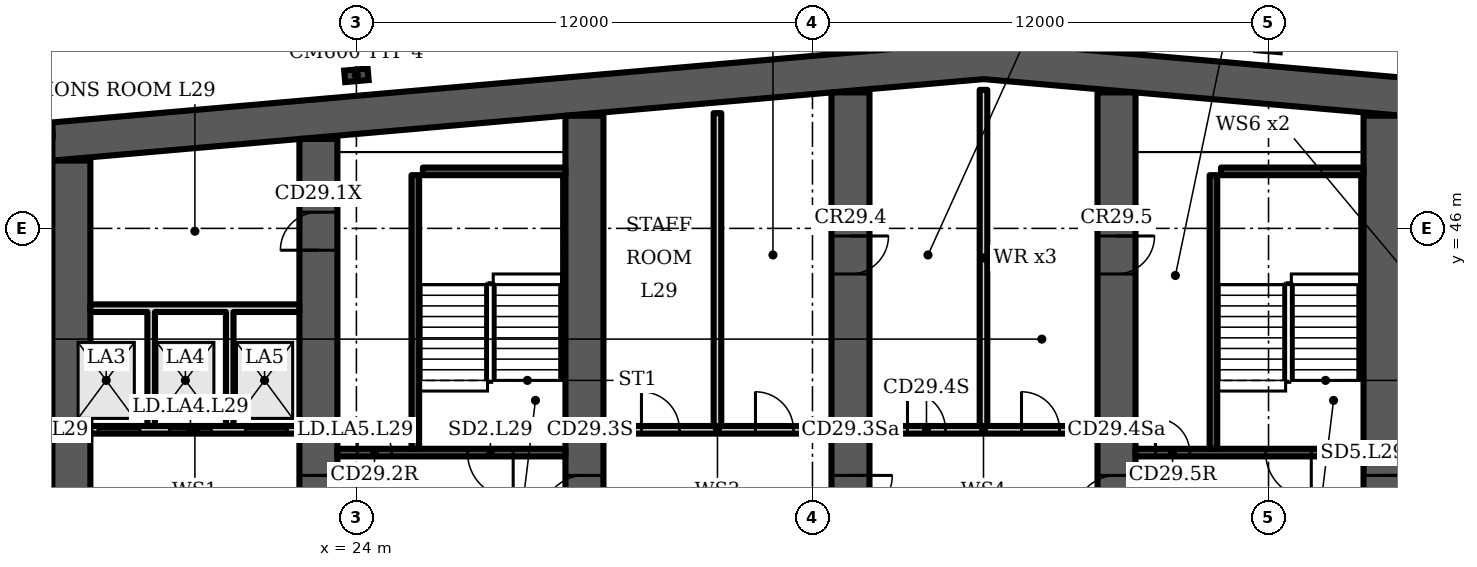
"""IFC4 building model, lengths in metres.
Left out: names, types, materials, properties, quantities, classifications, styles, units other than length and angle.
Written with IfcOpenShell. Run it as: python <this file> out.ifc"""

import sys

from ifc_helpers import new_model, si_unit, direction, frame, frame_2d, origin, origin_2d, place, context, subcontext, project, spatial, polyline, rectangle, i_section, outline, extrude, element, fill, save


model = new_model("IFC4")
c1 = context("Model", 3, precision=1e-05, world=origin(), true_north=direction((0.0, 1.0)))
c2 = subcontext(c1, "Body", "Model", "MODEL_VIEW")
j1 = project(units=[si_unit("LENGTHUNIT", "METRE"), si_unit("PLANEANGLEUNIT", "RADIAN")], contexts=[c1])
p1 = place(None, origin())
s1 = spatial("IfcSite", under=j1, at=p1, CompositionType="ELEMENT")
p2 = place(p1, origin())
s2 = spatial("IfcBuilding", under=s1, at=p2, CompositionType="ELEMENT")
p3 = place(p2, frame((0.0, 0.0, 125.5)))
s3 = spatial("IfcBuildingStorey", under=s2, at=p3, CompositionType="ELEMENT", Elevation=125.5)
p4 = place(p3, origin())
e1 = element("IfcWall", 1, at=p4, inside=s3, PredefinedType="SHEAR", context=c2, shape_type="SweptSolid", body=[
    extrude(outline(polyline([(16.0, 47.784), (40.5, 49.927), (65.0, 47.784), (65.0, 48.787), (40.5, 50.931), (16.0, 48.787), (16.0, 47.784)])), origin(), (0.0, 0.0, 1.0), 3.6),
])
p5 = place(p3, frame((16.5, 35.0, 0.0), z_axis=(0.0, 0.0, 1.0), x_axis=(0.0, 1.0, 0.0)))
e2 = element("IfcWall", 2, at=p5, inside=s3, PredefinedType="SHEAR", context=c2, shape_type="SweptSolid", body=[
    extrude(rectangle(XDim=12.784, YDim=1.0, at=frame_2d((6.392, 0.0))), origin(), (0.0, 0.0, 1.0), 3.6),
])
p6 = place(p3, frame((23.0, 35.0, 0.0), z_axis=(0.0, 0.0, 1.0), x_axis=(0.0, 1.0, 0.0)))
e3 = element("IfcWall", 3, at=p6, inside=s3, PredefinedType="SHEAR", context=c2, shape_type="SweptSolid", body=[
    extrude(rectangle(XDim=13.352, YDim=1.0, at=frame_2d((6.676, 0.0))), origin(), (0.0, 0.0, 1.0), 3.6),
])
p7 = place(p6, frame((10.426, 0.0, 0.0)))
e4 = element("IfcOpeningElement", 4, at=p7, cuts=e3, PredefinedType="OPENING", context=c2, shape_type="SweptSolid", body=[
    extrude(rectangle(XDim=1.0, YDim=2.1, at=frame_2d((0.5, 1.05))), frame((0.0, 0.51, 0.0), z_axis=(0.0, -1.0, 0.0), x_axis=(1.0, 0.0, 0.0)), (0.0, 0.0, 1.0), 1.02),
])
p8 = place(p6, frame((3.4, 0.0, 0.0)))
e5 = element("IfcOpeningElement", 5, at=p8, cuts=e3, PredefinedType="OPENING", context=c2, shape_type="SweptSolid", body=[
    extrude(rectangle(XDim=1.1, YDim=2.1, at=frame_2d((0.55, 1.05))), frame((0.0, 0.51, 0.0), z_axis=(0.0, -1.0, 0.0), x_axis=(1.0, 0.0, 0.0)), (0.0, 0.0, 1.0), 1.02),
])
p9 = place(p3, frame((30.0, 35.0, 0.0), z_axis=(0.0, 0.0, 1.0), x_axis=(0.0, 1.0, 0.0)))
e6 = element("IfcWall", 6, at=p9, inside=s3, PredefinedType="SHEAR", context=c2, shape_type="SweptSolid", body=[
    extrude(rectangle(XDim=13.965, YDim=1.0, at=frame_2d((6.982, 0.0))), origin(), (0.0, 0.0, 1.0), 3.6),
])
p10 = place(p9, frame((3.4, 0.0, 0.0)))
e7 = element("IfcOpeningElement", 7, at=p10, cuts=e6, PredefinedType="OPENING", context=c2, shape_type="SweptSolid", body=[
    extrude(rectangle(XDim=1.1, YDim=2.1, at=frame_2d((0.55, 1.05))), frame((0.0, 0.51, 0.0), z_axis=(0.0, -1.0, 0.0), x_axis=(1.0, 0.0, 0.0)), (0.0, 0.0, 1.0), 1.02),
])
p11 = place(p3, frame((37.0, 35.0, 0.0), z_axis=(0.0, 0.0, 1.0), x_axis=(0.0, 1.0, 0.0)))
e8 = element("IfcWall", 8, at=p11, inside=s3, PredefinedType="SHEAR", context=c2, shape_type="SweptSolid", body=[
    extrude(rectangle(XDim=14.577, YDim=1.0, at=frame_2d((7.289, 0.0))), origin(), (0.0, 0.0, 1.0), 3.6),
])
p12 = place(p11, frame((3.4, 0.0, 0.0)))
e9 = element("IfcOpeningElement", 9, at=p12, cuts=e8, PredefinedType="OPENING", context=c2, shape_type="SweptSolid", body=[
    extrude(rectangle(XDim=1.1, YDim=2.1, at=frame_2d((0.55, 1.05))), frame((0.0, 0.51, 0.0), z_axis=(0.0, -1.0, 0.0), x_axis=(1.0, 0.0, 0.0)), (0.0, 0.0, 1.0), 1.02),
])
p13 = place(p11, frame((9.8, 0.0, 0.0)))
e10 = element("IfcOpeningElement", 10, at=p13, cuts=e8, PredefinedType="OPENING", context=c2, shape_type="SweptSolid", body=[
    extrude(rectangle(XDim=1.0, YDim=2.1, at=frame_2d((0.5, 1.05))), frame((0.0, 0.51, 0.0), z_axis=(0.0, -1.0, 0.0), x_axis=(1.0, 0.0, 0.0)), (0.0, 0.0, 1.0), 1.02),
])
p14 = place(p3, frame((44.0, 35.0, 0.0), z_axis=(0.0, 0.0, 1.0), x_axis=(0.0, 1.0, 0.0)))
e11 = element("IfcWall", 11, at=p14, inside=s3, PredefinedType="SHEAR", context=c2, shape_type="SweptSolid", body=[
    extrude(rectangle(XDim=14.577, YDim=1.0, at=frame_2d((7.289, 0.0))), origin(), (0.0, 0.0, 1.0), 3.6),
])
p15 = place(p14, frame((3.4, 0.0, 0.0)))
e12 = element("IfcOpeningElement", 12, at=p15, cuts=e11, PredefinedType="OPENING", context=c2, shape_type="SweptSolid", body=[
    extrude(rectangle(XDim=1.1, YDim=2.1, at=frame_2d((0.55, 1.05))), frame((0.0, 0.51, 0.0), z_axis=(0.0, -1.0, 0.0), x_axis=(1.0, 0.0, 0.0)), (0.0, 0.0, 1.0), 1.02),
])
p16 = place(p14, frame((9.8, 0.0, 0.0)))
e13 = element("IfcOpeningElement", 13, at=p16, cuts=e11, PredefinedType="OPENING", context=c2, shape_type="SweptSolid", body=[
    extrude(rectangle(XDim=1.0, YDim=2.1, at=frame_2d((0.5, 1.05))), frame((0.0, 0.51, 0.0), z_axis=(0.0, -1.0, 0.0), x_axis=(1.0, 0.0, 0.0)), (0.0, 0.0, 1.0), 1.02),
])
p17 = place(p3, frame((51.0, 35.0, 0.0), z_axis=(0.0, 0.0, 1.0), x_axis=(0.0, 1.0, 0.0)))
e14 = element("IfcWall", 14, at=p17, inside=s3, PredefinedType="SHEAR", context=c2, shape_type="SweptSolid", body=[
    extrude(rectangle(XDim=13.965, YDim=1.0, at=frame_2d((6.982, 0.0))), origin(), (0.0, 0.0, 1.0), 3.6),
])
p18 = place(p17, frame((3.4, 0.0, 0.0)))
e15 = element("IfcOpeningElement", 15, at=p18, cuts=e14, PredefinedType="OPENING", context=c2, shape_type="SweptSolid", body=[
    extrude(rectangle(XDim=1.1, YDim=2.1, at=frame_2d((0.55, 1.05))), frame((0.0, 0.51, 0.0), z_axis=(0.0, -1.0, 0.0), x_axis=(1.0, 0.0, 0.0)), (0.0, 0.0, 1.0), 1.02),
])
for number, where, z_axis, x_axis in (
    (16, (24.0, 50.027, 0.0), (0.0, 0.0, 1.0), (-0.087, 0.996, 0.0)),
    (17, (48.0, 50.815, 0.0), (0.0, 0.0, 1.0), (0.087, 0.996, 0.0)),
):
    element("IfcColumn", number, at=place(p3, frame(where, z_axis=z_axis, x_axis=x_axis)), inside=s3, PredefinedType="COLUMN", context=c2, shape_type="SweptSolid", body=[
        extrude(i_section(OverallWidth=0.305, OverallDepth=0.62, WebThickness=0.021, FlangeThickness=0.04, FilletRadius=0.027, at=origin_2d()), origin(), (0.0, 0.0, 1.0), 3.6),
    ])
p19 = place(p3, frame((16.0, 48.587, 0.0), z_axis=(0.0, 0.0, 1.0), x_axis=(-0.996194, -0.087168, 0.0)))
e18 = element("IfcWall", 18, at=p19, inside=s3, PredefinedType="SOLIDWALL", context=c2, shape_type="SweptSolid", body=[
    extrude(rectangle(XDim=2.994, YDim=0.4, at=frame_2d((1.497, 0.0))), origin(), (0.0, 0.0, 1.0), 3.2),
])
p20 = place(p3, frame((17.0, 40.7, 0.0), z_axis=(0.0, 0.0, 1.0), x_axis=(1.0, 0.0, 0.0)))
e19 = element("IfcWall", 19, at=p20, inside=s3, PredefinedType="PARTITIONING", context=c2, shape_type="SweptSolid", body=[
    extrude(rectangle(XDim=5.5, YDim=0.2, at=frame_2d((2.75, 0.0))), origin(), (0.0, 0.0, 1.0), 3.2),
])
p21 = place(p20, frame((0.2, 0.0, 0.0)))
e20 = element("IfcOpeningElement", 20, at=p21, cuts=e19, PredefinedType="OPENING", context=c2, shape_type="SweptSolid", body=[
    extrude(rectangle(XDim=1.1, YDim=2.1, at=frame_2d((0.55, 1.05))), frame((0.0, 0.11, 0.0), z_axis=(0.0, -1.0, 0.0), x_axis=(1.0, 0.0, 0.0)), (0.0, 0.0, 1.0), 0.22),
])
p22 = place(p20, frame((2.083, 0.0, 0.0)))
e21 = element("IfcOpeningElement", 21, at=p22, cuts=e19, PredefinedType="OPENING", context=c2, shape_type="SweptSolid", body=[
    extrude(rectangle(XDim=1.1, YDim=2.1, at=frame_2d((0.55, 1.05))), frame((0.0, 0.11, 0.0), z_axis=(0.0, -1.0, 0.0), x_axis=(1.0, 0.0, 0.0)), (0.0, 0.0, 1.0), 0.22),
])
p23 = place(p20, frame((4.083, 0.0, 0.0)))
e22 = element("IfcOpeningElement", 22, at=p23, cuts=e19, PredefinedType="OPENING", context=c2, shape_type="SweptSolid", body=[
    extrude(rectangle(XDim=1.1, YDim=2.1, at=frame_2d((0.55, 1.05))), frame((0.0, 0.11, 0.0), z_axis=(0.0, -1.0, 0.0), x_axis=(1.0, 0.0, 0.0)), (0.0, 0.0, 1.0), 0.22),
])
p24 = place(p3, frame((0.0, 0.0, -0.0)))
e23 = element("IfcWall", 23, at=p24, inside=s3, PredefinedType="PARTITIONING", context=c2, shape_type="SweptSolid", body=[
    extrude(outline(polyline([(18.7, 40.8), (18.5, 40.8), (18.5, 43.8), (17.0, 43.8), (17.0, 44.0), (22.5, 44.0), (22.5, 43.8), (20.767, 43.8), (20.767, 40.8), (20.567, 40.8), (20.567, 43.8), (18.7, 43.8), (18.7, 40.8)])), origin(), (0.0, 0.0, 1.0), 3.2),
])
p25 = place(p3, frame((23.5, 40.1, 0.0), z_axis=(0.0, 0.0, 1.0), x_axis=(1.0, 0.0, 0.0)))
e24 = element("IfcWall", 24, at=p25, inside=s3, PredefinedType="SHEAR", context=c2, shape_type="SweptSolid", body=[
    extrude(rectangle(XDim=6.0, YDim=0.2, at=frame_2d((3.0, 0.0))), origin(), (0.0, 0.0, 1.0), 3.2),
])
p26 = place(p25, frame((3.425, 0.0, 0.0)))
e25 = element("IfcOpeningElement", 25, at=p26, cuts=e24, PredefinedType="OPENING", context=c2, shape_type="SweptSolid", body=[
    extrude(rectangle(XDim=1.2, YDim=2.1, at=frame_2d((0.6, 1.05))), frame((0.0, 0.11, 0.0), z_axis=(0.0, -1.0, 0.0), x_axis=(1.0, 0.0, 0.0)), (0.0, 0.0, 1.0), 0.22),
])
p27 = place(p25, frame((0.525, 0.0, 0.0)))
e26 = element("IfcOpeningElement", 26, at=p27, cuts=e24, PredefinedType="OPENING", context=c2, shape_type="SweptSolid", body=[
    extrude(rectangle(XDim=0.9, YDim=2.1, at=frame_2d((0.45, 1.05))), frame((0.0, 0.11, 0.0), z_axis=(0.0, -1.0, 0.0), x_axis=(1.0, 0.0, 0.0)), (0.0, 0.0, 1.0), 0.22),
])
p28 = place(p3, frame((25.55, 40.2, 0.0), z_axis=(0.0, 0.0, 1.0), x_axis=(0.0, 1.0, 0.0)))
e27 = element("IfcWall", 27, at=p28, inside=s3, PredefinedType="SHEAR", context=c2, shape_type="SweptSolid", body=[
    extrude(rectangle(XDim=7.2, YDim=0.2, at=frame_2d((3.6, 0.0))), origin(), (0.0, 0.0, 1.0), 3.2),
])
p29 = place(p3, frame((25.75, 47.5, 0.0), z_axis=(0.0, 0.0, 1.0), x_axis=(1.0, 0.0, 0.0)))
e28 = element("IfcWall", 28, at=p29, inside=s3, PredefinedType="SHEAR", context=c2, shape_type="SweptSolid", body=[
    extrude(rectangle(XDim=3.75, YDim=0.2, at=frame_2d((1.875, 0.0))), origin(), (0.0, 0.0, 1.0), 3.2),
])
p30 = place(p3, frame((30.5, 40.7, 0.0), z_axis=(0.0, 0.0, 1.0), x_axis=(1.0, 0.0, 0.0)))
e29 = element("IfcWall", 29, at=p30, inside=s3, PredefinedType="PARTITIONING", context=c2, shape_type="SweptSolid", body=[
    extrude(rectangle(XDim=6.0, YDim=0.2, at=frame_2d((3.0, 0.0))), origin(), (0.0, 0.0, 1.0), 3.2),
])
p31 = place(p30, frame((1.0, 0.0, 0.0)))
e30 = element("IfcOpeningElement", 30, at=p31, cuts=e29, PredefinedType="OPENING", context=c2, shape_type="SweptSolid", body=[
    extrude(rectangle(XDim=1.0, YDim=2.1, at=frame_2d((0.5, 1.05))), frame((0.0, 0.11, 0.0), z_axis=(0.0, -1.0, 0.0), x_axis=(1.0, 0.0, 0.0)), (0.0, 0.0, 1.0), 0.22),
])
p32 = place(p30, frame((4.0, 0.0, 0.0)))
e31 = element("IfcOpeningElement", 31, at=p32, cuts=e29, PredefinedType="OPENING", context=c2, shape_type="SweptSolid", body=[
    extrude(rectangle(XDim=1.0, YDim=2.1, at=frame_2d((0.5, 1.05))), frame((0.0, 0.11, 0.0), z_axis=(0.0, -1.0, 0.0), x_axis=(1.0, 0.0, 0.0)), (0.0, 0.0, 1.0), 0.22),
])
p33 = place(p3, frame((33.5, 40.8, 0.0), z_axis=(0.0, 0.0, 1.0), x_axis=(0.0, 1.0, 0.0)))
e32 = element("IfcWall", 32, at=p33, inside=s3, PredefinedType="PARTITIONING", context=c2, shape_type="SweptSolid", body=[
    extrude(rectangle(XDim=8.232, YDim=0.2, at=frame_2d((4.116, 0.0))), origin(), (0.0, 0.0, 1.0), 3.2),
])
p34 = place(p3, frame((37.5, 40.7, 0.0), z_axis=(0.0, 0.0, 1.0), x_axis=(1.0, 0.0, 0.0)))
e33 = element("IfcWall", 33, at=p34, inside=s3, PredefinedType="PARTITIONING", context=c2, shape_type="SweptSolid", body=[
    extrude(rectangle(XDim=6.0, YDim=0.2, at=frame_2d((3.0, 0.0))), origin(), (0.0, 0.0, 1.0), 3.2),
])
p35 = place(p34, frame((1.0, 0.0, 0.0)))
e34 = element("IfcOpeningElement", 34, at=p35, cuts=e33, PredefinedType="OPENING", context=c2, shape_type="SweptSolid", body=[
    extrude(rectangle(XDim=1.0, YDim=2.1, at=frame_2d((0.5, 1.05))), frame((0.0, 0.11, 0.0), z_axis=(0.0, -1.0, 0.0), x_axis=(1.0, 0.0, 0.0)), (0.0, 0.0, 1.0), 0.22),
])
p36 = place(p34, frame((4.0, 0.0, 0.0)))
e35 = element("IfcOpeningElement", 35, at=p36, cuts=e33, PredefinedType="OPENING", context=c2, shape_type="SweptSolid", body=[
    extrude(rectangle(XDim=1.0, YDim=2.1, at=frame_2d((0.5, 1.05))), frame((0.0, 0.11, 0.0), z_axis=(0.0, -1.0, 0.0), x_axis=(1.0, 0.0, 0.0)), (0.0, 0.0, 1.0), 0.22),
])
p37 = place(p3, frame((40.5, 40.8, 0.0), z_axis=(0.0, 0.0, 1.0), x_axis=(0.0, 1.0, 0.0)))
e36 = element("IfcWall", 36, at=p37, inside=s3, PredefinedType="PARTITIONING", context=c2, shape_type="SweptSolid", body=[
    extrude(rectangle(XDim=8.844, YDim=0.2, at=frame_2d((4.422, 0.0))), origin(), (0.0, 0.0, 1.0), 3.2),
])
p38 = place(p3, frame((44.5, 40.1, 0.0), z_axis=(0.0, 0.0, 1.0), x_axis=(1.0, 0.0, 0.0)))
e37 = element("IfcWall", 37, at=p38, inside=s3, PredefinedType="SHEAR", context=c2, shape_type="SweptSolid", body=[
    extrude(rectangle(XDim=6.0, YDim=0.2, at=frame_2d((3.0, 0.0))), origin(), (0.0, 0.0, 1.0), 3.2),
])
p39 = place(p38, frame((3.425, 0.0, 0.0)))
e38 = element("IfcOpeningElement", 38, at=p39, cuts=e37, PredefinedType="OPENING", context=c2, shape_type="SweptSolid", body=[
    extrude(rectangle(XDim=1.2, YDim=2.1, at=frame_2d((0.6, 1.05))), frame((0.0, 0.11, 0.0), z_axis=(0.0, -1.0, 0.0), x_axis=(1.0, 0.0, 0.0)), (0.0, 0.0, 1.0), 0.22),
])
p40 = place(p38, frame((0.525, 0.0, 0.0)))
e39 = element("IfcOpeningElement", 39, at=p40, cuts=e37, PredefinedType="OPENING", context=c2, shape_type="SweptSolid", body=[
    extrude(rectangle(XDim=0.9, YDim=2.1, at=frame_2d((0.45, 1.05))), frame((0.0, 0.11, 0.0), z_axis=(0.0, -1.0, 0.0), x_axis=(1.0, 0.0, 0.0)), (0.0, 0.0, 1.0), 0.22),
])
p41 = place(p3, frame((46.55, 40.2, 0.0), z_axis=(0.0, 0.0, 1.0), x_axis=(0.0, 1.0, 0.0)))
e40 = element("IfcWall", 40, at=p41, inside=s3, PredefinedType="SHEAR", context=c2, shape_type="SweptSolid", body=[
    extrude(rectangle(XDim=7.2, YDim=0.2, at=frame_2d((3.6, 0.0))), origin(), (0.0, 0.0, 1.0), 3.2),
])
p42 = place(p3, frame((46.75, 47.5, 0.0), z_axis=(0.0, 0.0, 1.0), x_axis=(1.0, 0.0, 0.0)))
e41 = element("IfcWall", 41, at=p42, inside=s3, PredefinedType="SHEAR", context=c2, shape_type="SweptSolid", body=[
    extrude(rectangle(XDim=3.75, YDim=0.2, at=frame_2d((1.875, 0.0))), origin(), (0.0, 0.0, 1.0), 3.2),
])
p43 = place(p21, origin())
e42 = element("IfcDoor", 42, at=p43, inside=s3, OperationType="DOUBLE_DOOR_SLIDING", PredefinedType="DOOR", context=c2, shape_type="SweptSolid", body=[
    extrude(rectangle(XDim=1.1, YDim=2.1, at=frame_2d((0.55, 1.05))), frame((0.0, 0.025, 0.0), z_axis=(0.0, -1.0, 0.0), x_axis=(1.0, 0.0, 0.0)), (0.0, 0.0, 1.0), 0.05),
])
fill(e20, e42)
p44 = place(p22, origin())
e43 = element("IfcDoor", 43, at=p44, inside=s3, OperationType="DOUBLE_DOOR_SLIDING", PredefinedType="DOOR", context=c2, shape_type="SweptSolid", body=[
    extrude(rectangle(XDim=1.1, YDim=2.1, at=frame_2d((0.55, 1.05))), frame((0.0, 0.025, 0.0), z_axis=(0.0, -1.0, 0.0), x_axis=(1.0, 0.0, 0.0)), (0.0, 0.0, 1.0), 0.05),
])
fill(e21, e43)
p45 = place(p23, origin())
e44 = element("IfcDoor", 44, at=p45, inside=s3, OperationType="DOUBLE_DOOR_SLIDING", PredefinedType="DOOR", context=c2, shape_type="SweptSolid", body=[
    extrude(rectangle(XDim=1.1, YDim=2.1, at=frame_2d((0.55, 1.05))), frame((0.0, 0.025, 0.0), z_axis=(0.0, -1.0, 0.0), x_axis=(1.0, 0.0, 0.0)), (0.0, 0.0, 1.0), 0.05),
])
fill(e22, e44)
p46 = place(p7, origin())
e45 = element("IfcDoor", 45, at=p46, inside=s3, OperationType="SINGLE_SWING_LEFT", PredefinedType="DOOR", context=c2, shape_type="SweptSolid", body=[
    extrude(rectangle(XDim=1.0, YDim=2.1, at=frame_2d((0.5, 1.05))), frame((0.0, 0.5, 0.0), z_axis=(0.0, -1.0, 0.0), x_axis=(1.0, 0.0, 0.0)), (0.0, 0.0, 1.0), 1.0),
])
fill(e4, e45)
p47 = place(p26, origin())
e46 = element("IfcDoor", 46, at=p47, inside=s3, OperationType="SINGLE_SWING_RIGHT", PredefinedType="DOOR", context=c2, shape_type="SweptSolid", body=[
    extrude(rectangle(XDim=1.2, YDim=2.1, at=frame_2d((0.6, 1.05))), frame((0.0, 0.025, 0.0), z_axis=(0.0, -1.0, 0.0), x_axis=(1.0, 0.0, 0.0)), (0.0, 0.0, 1.0), 0.05),
])
fill(e25, e46)
p48 = place(p27, origin())
e47 = element("IfcDoor", 47, at=p48, inside=s3, OperationType="SINGLE_SWING_LEFT", PredefinedType="DOOR", context=c2, shape_type="SweptSolid", body=[
    extrude(rectangle(XDim=0.9, YDim=2.1, at=frame_2d((0.45, 1.05))), frame((0.0, 0.025, 0.0), z_axis=(0.0, -1.0, 0.0), x_axis=(1.0, 0.0, 0.0)), (0.0, 0.0, 1.0), 0.05),
])
fill(e26, e47)
p49 = place(p31, origin())
e48 = element("IfcDoor", 48, at=p49, inside=s3, OperationType="SINGLE_SWING_LEFT", PredefinedType="DOOR", context=c2, shape_type="SweptSolid", body=[
    extrude(rectangle(XDim=1.0, YDim=2.1, at=frame_2d((0.5, 1.05))), frame((0.0, 0.025, 0.0), z_axis=(0.0, -1.0, 0.0), x_axis=(1.0, 0.0, 0.0)), (0.0, 0.0, 1.0), 0.05),
])
fill(e30, e48)
p50 = place(p32, origin())
e49 = element("IfcDoor", 49, at=p50, inside=s3, OperationType="SINGLE_SWING_LEFT", PredefinedType="DOOR", context=c2, shape_type="SweptSolid", body=[
    extrude(rectangle(XDim=1.0, YDim=2.1, at=frame_2d((0.5, 1.05))), frame((0.0, 0.025, 0.0), z_axis=(0.0, -1.0, 0.0), x_axis=(1.0, 0.0, 0.0)), (0.0, 0.0, 1.0), 0.05),
])
fill(e31, e49)
p51 = place(p35, origin())
e50 = element("IfcDoor", 50, at=p51, inside=s3, OperationType="SINGLE_SWING_LEFT", PredefinedType="DOOR", context=c2, shape_type="SweptSolid", body=[
    extrude(rectangle(XDim=1.0, YDim=2.1, at=frame_2d((0.5, 1.05))), frame((0.0, 0.025, 0.0), z_axis=(0.0, -1.0, 0.0), x_axis=(1.0, 0.0, 0.0)), (0.0, 0.0, 1.0), 0.05),
])
fill(e34, e50)
p52 = place(p36, origin())
e51 = element("IfcDoor", 51, at=p52, inside=s3, OperationType="SINGLE_SWING_LEFT", PredefinedType="DOOR", context=c2, shape_type="SweptSolid", body=[
    extrude(rectangle(XDim=1.0, YDim=2.1, at=frame_2d((0.5, 1.05))), frame((0.0, 0.025, 0.0), z_axis=(0.0, -1.0, 0.0), x_axis=(1.0, 0.0, 0.0)), (0.0, 0.0, 1.0), 0.05),
])
fill(e35, e51)
p53 = place(p39, origin())
e52 = element("IfcDoor", 52, at=p53, inside=s3, OperationType="SINGLE_SWING_RIGHT", PredefinedType="DOOR", context=c2, shape_type="SweptSolid", body=[
    extrude(rectangle(XDim=1.2, YDim=2.1, at=frame_2d((0.6, 1.05))), frame((0.0, 0.025, 0.0), z_axis=(0.0, -1.0, 0.0), x_axis=(1.0, 0.0, 0.0)), (0.0, 0.0, 1.0), 0.05),
])
fill(e38, e52)
p54 = place(p40, origin())
e53 = element("IfcDoor", 53, at=p54, inside=s3, OperationType="SINGLE_SWING_LEFT", PredefinedType="DOOR", context=c2, shape_type="SweptSolid", body=[
    extrude(rectangle(XDim=0.9, YDim=2.1, at=frame_2d((0.45, 1.05))), frame((0.0, 0.025, 0.0), z_axis=(0.0, -1.0, 0.0), x_axis=(1.0, 0.0, 0.0)), (0.0, 0.0, 1.0), 0.05),
])
fill(e39, e53)
p55 = place(p8, origin())
e54 = element("IfcDoor", 54, at=p55, inside=s3, OperationType="SINGLE_SWING_RIGHT", PredefinedType="DOOR", context=c2, shape_type="SweptSolid", body=[
    extrude(rectangle(XDim=1.1, YDim=2.1, at=frame_2d((0.55, 1.05))), frame((0.0, 0.025, 0.0), z_axis=(0.0, -1.0, 0.0), x_axis=(1.0, 0.0, 0.0)), (0.0, 0.0, 1.0), 0.05),
])
fill(e5, e54)
p56 = place(p10, origin())
e55 = element("IfcDoor", 55, at=p56, inside=s3, OperationType="SINGLE_SWING_LEFT", PredefinedType="DOOR", context=c2, shape_type="SweptSolid", body=[
    extrude(rectangle(XDim=1.1, YDim=2.1, at=frame_2d((0.55, 1.05))), frame((0.0, 0.025, 0.0), z_axis=(0.0, -1.0, 0.0), x_axis=(1.0, 0.0, 0.0)), (0.0, 0.0, 1.0), 0.05),
])
fill(e7, e55)
p57 = place(p12, origin())
e56 = element("IfcDoor", 56, at=p57, inside=s3, OperationType="SINGLE_SWING_RIGHT", PredefinedType="DOOR", context=c2, shape_type="SweptSolid", body=[
    extrude(rectangle(XDim=1.1, YDim=2.1, at=frame_2d((0.55, 1.05))), frame((0.0, 0.025, 0.0), z_axis=(0.0, -1.0, 0.0), x_axis=(1.0, 0.0, 0.0)), (0.0, 0.0, 1.0), 0.05),
])
fill(e9, e56)
p58 = place(p13, origin())
e57 = element("IfcDoor", 57, at=p58, inside=s3, OperationType="SINGLE_SWING_RIGHT", PredefinedType="DOOR", context=c2, shape_type="SweptSolid", body=[
    extrude(rectangle(XDim=1.0, YDim=2.1, at=frame_2d((0.5, 1.05))), frame((0.0, 0.5, 0.0), z_axis=(0.0, -1.0, 0.0), x_axis=(1.0, 0.0, 0.0)), (0.0, 0.0, 1.0), 1.0),
])
fill(e10, e57)
p59 = place(p15, origin())
e58 = element("IfcDoor", 58, at=p59, inside=s3, OperationType="SINGLE_SWING_LEFT", PredefinedType="DOOR", context=c2, shape_type="SweptSolid", body=[
    extrude(rectangle(XDim=1.1, YDim=2.1, at=frame_2d((0.55, 1.05))), frame((0.0, 0.025, 0.0), z_axis=(0.0, -1.0, 0.0), x_axis=(1.0, 0.0, 0.0)), (0.0, 0.0, 1.0), 0.05),
])
fill(e12, e58)
p60 = place(p16, origin())
e59 = element("IfcDoor", 59, at=p60, inside=s3, OperationType="SINGLE_SWING_RIGHT", PredefinedType="DOOR", context=c2, shape_type="SweptSolid", body=[
    extrude(rectangle(XDim=1.0, YDim=2.1, at=frame_2d((0.5, 1.05))), frame((0.0, 0.5, 0.0), z_axis=(0.0, -1.0, 0.0), x_axis=(1.0, 0.0, 0.0)), (0.0, 0.0, 1.0), 1.0),
])
fill(e13, e59)
p61 = place(p18, origin())
e60 = element("IfcDoor", 60, at=p61, inside=s3, OperationType="SINGLE_SWING_RIGHT", PredefinedType="DOOR", context=c2, shape_type="SweptSolid", body=[
    extrude(rectangle(XDim=1.1, YDim=2.1, at=frame_2d((0.55, 1.05))), frame((0.0, 0.025, 0.0), z_axis=(0.0, -1.0, 0.0), x_axis=(1.0, 0.0, 0.0)), (0.0, 0.0, 1.0), 0.05),
])
fill(e15, e60)
save(model, sys.argv[1])
